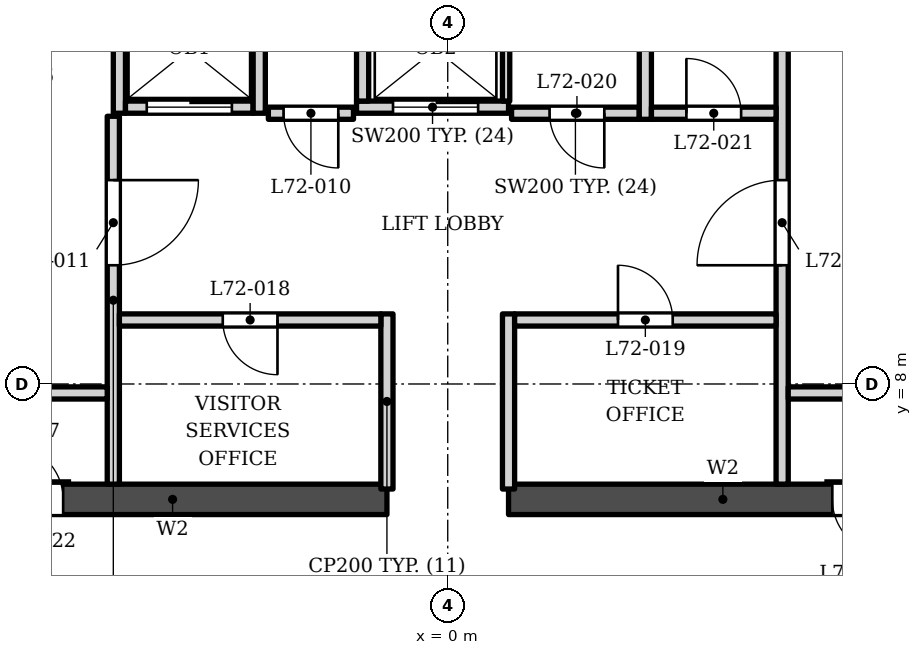
"""IFC4 building model, lengths in metres.
Left out: names, types, materials, properties, quantities, classifications, styles, units other than length and angle.
Written with IfcOpenShell. Run it as: python <this file> out.ifc"""

import sys

from ifc_helpers import new_model, si_unit, direction, frame, frame_2d, origin, place, context, subcontext, project, spatial, rectangle, extrude, element, fill, save


model = new_model("IFC4")
c1 = context("Model", 3, precision=1e-05, world=origin(), true_north=direction((0.0, 1.0)))
c2 = subcontext(c1, "Body", "Model", "MODEL_VIEW")
j1 = project(units=[si_unit("LENGTHUNIT", "METRE"), si_unit("PLANEANGLEUNIT", "RADIAN")], contexts=[c1])
p1 = place(None, origin())
s1 = spatial("IfcSite", under=j1, at=p1, CompositionType="ELEMENT")
p2 = place(p1, origin())
s2 = spatial("IfcBuilding", under=s1, at=p2, CompositionType="ELEMENT")
p3 = place(p2, frame((0.0, 0.0, 302.5)))
s3 = spatial("IfcBuildingStorey", under=s2, at=p3, CompositionType="ELEMENT", Elevation=302.5)
p4 = place(p3, frame((-8.05, 6.103, 0.0), z_axis=(0.0, 0.0, 1.0), x_axis=(1.0, 0.0, 0.0)))
e1 = element("IfcWall", 1, at=p4, inside=s3, PredefinedType="SHEAR", context=c2, shape_type="SweptSolid", body=[
    extrude(rectangle(XDim=7.05, YDim=0.5, at=frame_2d((3.525, 0.0))), origin(), (0.0, 0.0, 1.0), 8.0),
])
p5 = place(p4, frame((0.825, 0.0, 0.0)))
e2 = element("IfcOpeningElement", 2, at=p5, cuts=e1, PredefinedType="OPENING", context=c2, shape_type="SweptSolid", body=[
    extrude(rectangle(XDim=0.9, YDim=2.1, at=frame_2d((0.45, 1.05))), frame((0.0, 0.26, 0.0), z_axis=(0.0, -1.0, 0.0), x_axis=(1.0, 0.0, 0.0)), (0.0, 0.0, 1.0), 0.52),
])
p6 = place(p3, frame((1.0, 6.103, 0.0), z_axis=(0.0, 0.0, 1.0), x_axis=(1.0, 0.0, 0.0)))
e3 = element("IfcWall", 3, at=p6, inside=s3, PredefinedType="SHEAR", context=c2, shape_type="SweptSolid", body=[
    extrude(rectangle(XDim=7.05, YDim=0.5, at=frame_2d((3.525, 0.0))), origin(), (0.0, 0.0, 1.0), 8.0),
])
p7 = place(p6, frame((5.325, 0.0, 0.0)))
e4 = element("IfcOpeningElement", 4, at=p7, cuts=e3, PredefinedType="OPENING", context=c2, shape_type="SweptSolid", body=[
    extrude(rectangle(XDim=0.9, YDim=2.1, at=frame_2d((0.45, 1.05))), frame((0.0, 0.26, 0.0), z_axis=(0.0, -1.0, 0.0), x_axis=(1.0, 0.0, 0.0)), (0.0, 0.0, 1.0), 0.52),
])
for number, where, z_axis, x_axis in (
    (5, (-1.0, 6.273, 0.0), (0.0, 0.0, 1.0), (0.0, 1.0, 0.0)),
    (6, (1.0, 6.273, 0.0), (0.0, 0.0, 1.0), (0.0, 1.0, 0.0)),
):
    element("IfcWall", number, at=place(p3, frame(where, z_axis=z_axis, x_axis=x_axis)), inside=s3, PredefinedType="PARTITIONING", context=c2, shape_type="SweptSolid", body=[
        extrude(rectangle(XDim=2.88, YDim=0.2, at=frame_2d((1.44, 0.0))), origin(), (0.0, 0.0, 1.0), 7.8),
    ])
p8 = place(p3, frame((-5.5, 6.353, 0.0), z_axis=(0.0, 0.0, 1.0), x_axis=(0.0, 1.0, 0.0)))
e7 = element("IfcWall", 7, at=p8, inside=s3, PredefinedType="SOLIDWALL", context=c2, shape_type="SweptSolid", body=[
    extrude(rectangle(XDim=6.05, YDim=0.2, at=frame_2d((3.025, 0.0))), origin(), (0.0, 0.0, 1.0), 7.8),
])
p9 = place(p8, frame((3.6, 0.0, 0.0)))
e8 = element("IfcOpeningElement", 8, at=p9, cuts=e7, PredefinedType="OPENING", context=c2, shape_type="SweptSolid", body=[
    extrude(rectangle(XDim=1.4, YDim=2.1, at=frame_2d((0.7, 1.05))), frame((0.0, 0.11, 0.0), z_axis=(0.0, -1.0, 0.0), x_axis=(1.0, 0.0, 0.0)), (0.0, 0.0, 1.0), 0.22),
])
p10 = place(p3, frame((5.5, 6.353, 0.0), z_axis=(0.0, 0.0, 1.0), x_axis=(0.0, 1.0, 0.0)))
e9 = element("IfcWall", 9, at=p10, inside=s3, PredefinedType="SOLIDWALL", context=c2, shape_type="SweptSolid", body=[
    extrude(rectangle(XDim=7.85, YDim=0.2, at=frame_2d((3.925, 0.0))), origin(), (0.0, 0.0, 1.0), 7.8),
])
p11 = place(p10, frame((3.6, 0.0, 0.0)))
e10 = element("IfcOpeningElement", 10, at=p11, cuts=e9, PredefinedType="OPENING", context=c2, shape_type="SweptSolid", body=[
    extrude(rectangle(XDim=1.4, YDim=2.1, at=frame_2d((0.7, 1.05))), frame((0.0, 0.11, 0.0), z_axis=(0.0, -1.0, 0.0), x_axis=(1.0, 0.0, 0.0)), (0.0, 0.0, 1.0), 0.22),
])
for number, where, z_axis, x_axis in (
    (11, (-8.05, 7.853, 0.0), (0.0, 0.0, 1.0), (1.0, 0.0, 0.0)),
    (12, (5.6, 7.853, 0.0), (0.0, 0.0, 1.0), (1.0, 0.0, 0.0)),
):
    element("IfcWall", number, at=place(p3, frame(where, z_axis=z_axis, x_axis=x_axis)), inside=s3, PredefinedType="SOLIDWALL", context=c2, shape_type="SweptSolid", body=[
        extrude(rectangle(XDim=2.45, YDim=0.2, at=frame_2d((1.225, 0.0))), origin(), (0.0, 0.0, 1.0), 7.8),
    ])
p12 = place(p3, frame((-5.4, 9.052, 0.0), z_axis=(0.0, 0.0, 1.0), x_axis=(1.0, 0.0, 0.0)))
e13 = element("IfcWall", 13, at=p12, inside=s3, PredefinedType="PARTITIONING", context=c2, shape_type="SweptSolid", body=[
    extrude(rectangle(XDim=4.3, YDim=0.2, at=frame_2d((2.15, 0.0))), origin(), (0.0, 0.0, 1.0), 7.8),
])
p13 = place(p12, frame((1.7, 0.0, 0.0)))
e14 = element("IfcOpeningElement", 14, at=p13, cuts=e13, PredefinedType="OPENING", context=c2, shape_type="SweptSolid", body=[
    extrude(rectangle(XDim=0.9, YDim=2.1, at=frame_2d((0.45, 1.05))), frame((0.0, 0.11, 0.0), z_axis=(0.0, -1.0, 0.0), x_axis=(1.0, 0.0, 0.0)), (0.0, 0.0, 1.0), 0.22),
])
p14 = place(p3, frame((1.1, 9.052, 0.0), z_axis=(0.0, 0.0, 1.0), x_axis=(1.0, 0.0, 0.0)))
e15 = element("IfcWall", 15, at=p14, inside=s3, PredefinedType="PARTITIONING", context=c2, shape_type="SweptSolid", body=[
    extrude(rectangle(XDim=4.3, YDim=0.2, at=frame_2d((2.15, 0.0))), origin(), (0.0, 0.0, 1.0), 7.8),
])
p15 = place(p14, frame((1.7, 0.0, 0.0)))
e16 = element("IfcOpeningElement", 16, at=p15, cuts=e15, PredefinedType="OPENING", context=c2, shape_type="SweptSolid", body=[
    extrude(rectangle(XDim=0.9, YDim=2.1, at=frame_2d((0.45, 1.05))), frame((0.0, 0.11, 0.0), z_axis=(0.0, -1.0, 0.0), x_axis=(1.0, 0.0, 0.0)), (0.0, 0.0, 1.0), 0.22),
])
p16 = place(p3, frame((-2.95, 12.453, 0.0), z_axis=(0.0, 0.0, 1.0), x_axis=(1.0, 0.0, 0.0)))
e17 = element("IfcWall", 17, at=p16, inside=s3, PredefinedType="SOLIDWALL", context=c2, shape_type="SweptSolid", body=[
    extrude(rectangle(XDim=1.4, YDim=0.2, at=frame_2d((0.7, 0.0))), origin(), (0.0, 0.0, 1.0), 7.8),
])
p17 = place(p16, frame((0.25, 0.0, 0.0)))
e18 = element("IfcOpeningElement", 18, at=p17, cuts=e17, PredefinedType="OPENING", context=c2, shape_type="SweptSolid", body=[
    extrude(rectangle(XDim=0.9, YDim=2.1, at=frame_2d((0.45, 1.05))), frame((0.0, 0.11, 0.0), z_axis=(0.0, -1.0, 0.0), x_axis=(1.0, 0.0, 0.0)), (0.0, 0.0, 1.0), 0.22),
])
p18 = place(p3, frame((1.05, 12.453, 0.0), z_axis=(0.0, 0.0, 1.0), x_axis=(1.0, 0.0, 0.0)))
e19 = element("IfcWall", 19, at=p18, inside=s3, PredefinedType="SOLIDWALL", context=c2, shape_type="SweptSolid", body=[
    extrude(rectangle(XDim=2.1, YDim=0.2, at=frame_2d((1.05, 0.0))), origin(), (0.0, 0.0, 1.0), 7.8),
])
p19 = place(p18, frame((0.625, 0.0, 0.0)))
e20 = element("IfcOpeningElement", 20, at=p19, cuts=e19, PredefinedType="OPENING", context=c2, shape_type="SweptSolid", body=[
    extrude(rectangle(XDim=0.9, YDim=2.1, at=frame_2d((0.45, 1.05))), frame((0.0, 0.11, 0.0), z_axis=(0.0, -1.0, 0.0), x_axis=(1.0, 0.0, 0.0)), (0.0, 0.0, 1.0), 0.22),
])
p20 = place(p3, frame((3.25, 12.353, 0.0), z_axis=(0.0, 0.0, 1.0), x_axis=(0.0, 1.0, 0.0)))
e21 = element("IfcWall", 21, at=p20, inside=s3, PredefinedType="PARTITIONING", context=c2, shape_type="SweptSolid", body=[
    extrude(rectangle(XDim=3.2, YDim=0.2, at=frame_2d((1.6, 0.0))), origin(), (0.0, 0.0, 1.0), 7.8),
])
p21 = place(p3, frame((3.35, 12.453, 0.0), z_axis=(0.0, 0.0, 1.0), x_axis=(1.0, 0.0, 0.0)))
e22 = element("IfcWall", 22, at=p21, inside=s3, PredefinedType="PARTITIONING", context=c2, shape_type="SweptSolid", body=[
    extrude(rectangle(XDim=2.05, YDim=0.2, at=frame_2d((1.025, 0.0))), origin(), (0.0, 0.0, 1.0), 7.8),
])
p22 = place(p21, frame((0.575, 0.0, 0.0)))
e23 = element("IfcOpeningElement", 23, at=p22, cuts=e22, PredefinedType="OPENING", context=c2, shape_type="SweptSolid", body=[
    extrude(rectangle(XDim=0.9, YDim=2.1, at=frame_2d((0.45, 1.05))), frame((0.0, 0.11, 0.0), z_axis=(0.0, -1.0, 0.0), x_axis=(1.0, 0.0, 0.0)), (0.0, 0.0, 1.0), 0.22),
])
p23 = place(p3, frame((-5.4, 12.453, 0.0), z_axis=(0.0, 0.0, 1.0), x_axis=(0.0, 1.0, 0.0)))
e24 = element("IfcWall", 24, at=p23, inside=s3, PredefinedType="SOLIDWALL", context=c2, shape_type="SweptSolid", body=[
    extrude(rectangle(XDim=3.0, YDim=0.2, at=frame_2d((1.5, 0.0))), origin(), (0.0, 0.0, 1.0), 7.8),
])
p24 = place(p3, frame((-5.3, 12.552, 0.0), z_axis=(0.0, 0.0, 1.0), x_axis=(1.0, 0.0, 0.0)))
e25 = element("IfcWall", 25, at=p24, inside=s3, PredefinedType="SOLIDWALL", context=c2, shape_type="SweptSolid", body=[
    extrude(rectangle(XDim=2.1, YDim=0.2, at=frame_2d((1.05, 0.0))), origin(), (0.0, 0.0, 1.0), 7.8),
])
p25 = place(p24, frame((0.35, 0.0, 0.0)))
e26 = element("IfcOpeningElement", 26, at=p25, cuts=e25, PredefinedType="OPENING", context=c2, shape_type="SweptSolid", body=[
    extrude(rectangle(XDim=1.4, YDim=2.4, at=frame_2d((0.7, 1.2))), frame((0.0, 0.11, 0.0), z_axis=(0.0, -1.0, 0.0), x_axis=(1.0, 0.0, 0.0)), (0.0, 0.0, 1.0), 0.22),
])
p26 = place(p3, frame((-3.1, 12.453, 0.0), z_axis=(0.0, 0.0, 1.0), x_axis=(0.0, 1.0, 0.0)))
e27 = element("IfcWall", 27, at=p26, inside=s3, PredefinedType="SOLIDWALL", context=c2, shape_type="SweptSolid", body=[
    extrude(rectangle(XDim=3.0, YDim=0.2, at=frame_2d((1.5, 0.0))), origin(), (0.0, 0.0, 1.0), 7.8),
])
p27 = place(p3, frame((-1.5, 12.552, 0.0), z_axis=(0.0, 0.0, 1.0), x_axis=(1.0, 0.0, 0.0)))
e28 = element("IfcWall", 28, at=p27, inside=s3, PredefinedType="SOLIDWALL", context=c2, shape_type="SweptSolid", body=[
    extrude(rectangle(XDim=2.5, YDim=0.2, at=frame_2d((1.25, 0.0))), origin(), (0.0, 0.0, 1.0), 7.8),
])
p28 = place(p27, frame((0.6, 0.0, 0.0)))
e29 = element("IfcOpeningElement", 29, at=p28, cuts=e28, PredefinedType="OPENING", context=c2, shape_type="SweptSolid", body=[
    extrude(rectangle(XDim=1.4, YDim=2.4, at=frame_2d((0.7, 1.2))), frame((0.0, 0.11, 0.0), z_axis=(0.0, -1.0, 0.0), x_axis=(1.0, 0.0, 0.0)), (0.0, 0.0, 1.0), 0.22),
])
p29 = place(p3, frame((-1.4, 12.653, 0.0), z_axis=(0.0, 0.0, 1.0), x_axis=(0.0, 1.0, 0.0)))
e30 = element("IfcWall", 30, at=p29, inside=s3, PredefinedType="SOLIDWALL", context=c2, shape_type="SweptSolid", body=[
    extrude(rectangle(XDim=2.6, YDim=0.2, at=frame_2d((1.3, 0.0))), origin(), (0.0, 0.0, 1.0), 7.8),
])
p30 = place(p3, frame((0.96, 12.653, 0.0), z_axis=(0.0, 0.0, 1.0), x_axis=(0.0, 1.0, 0.0)))
e31 = element("IfcWall", 31, at=p30, inside=s3, PredefinedType="SOLIDWALL", context=c2, shape_type="SweptSolid", body=[
    extrude(rectangle(XDim=2.6, YDim=0.12, at=frame_2d((1.3, 0.0))), origin(), (0.0, 0.0, 1.0), 7.8),
])
p31 = place(p25, origin())
e32 = element("IfcDoor", 32, at=p31, inside=s3, OperationType="DOUBLE_DOOR_SLIDING", PredefinedType="DOOR", context=c2, shape_type="SweptSolid", body=[
    extrude(rectangle(XDim=1.4, YDim=2.4, at=frame_2d((0.7, 1.2))), frame((0.0, 0.025, 0.0), z_axis=(0.0, -1.0, 0.0), x_axis=(1.0, 0.0, 0.0)), (0.0, 0.0, 1.0), 0.05),
])
fill(e26, e32)
p32 = place(p28, origin())
e33 = element("IfcDoor", 33, at=p32, inside=s3, OperationType="DOUBLE_DOOR_SLIDING", PredefinedType="DOOR", context=c2, shape_type="SweptSolid", body=[
    extrude(rectangle(XDim=1.4, YDim=2.4, at=frame_2d((0.7, 1.2))), frame((0.0, 0.025, 0.0), z_axis=(0.0, -1.0, 0.0), x_axis=(1.0, 0.0, 0.0)), (0.0, 0.0, 1.0), 0.05),
])
fill(e29, e33)
p33 = place(p17, origin())
e34 = element("IfcDoor", 34, at=p33, inside=s3, OperationType="SINGLE_SWING_RIGHT", PredefinedType="DOOR", context=c2, shape_type="SweptSolid", body=[
    extrude(rectangle(XDim=0.9, YDim=2.1, at=frame_2d((0.45, 1.05))), frame((0.0, 0.025, 0.0), z_axis=(0.0, -1.0, 0.0), x_axis=(1.0, 0.0, 0.0)), (0.0, 0.0, 1.0), 0.05),
])
fill(e18, e34)
p34 = place(p9, origin())
e35 = element("IfcDoor", 35, at=p34, inside=s3, OperationType="SINGLE_SWING_RIGHT", PredefinedType="DOOR", context=c2, shape_type="SweptSolid", body=[
    extrude(rectangle(XDim=1.4, YDim=2.1, at=frame_2d((0.7, 1.05))), frame((0.0, 0.025, 0.0), z_axis=(0.0, -1.0, 0.0), x_axis=(1.0, 0.0, 0.0)), (0.0, 0.0, 1.0), 0.05),
])
fill(e8, e35)
p35 = place(p11, origin())
e36 = element("IfcDoor", 36, at=p35, inside=s3, OperationType="SINGLE_SWING_LEFT", PredefinedType="DOOR", context=c2, shape_type="SweptSolid", body=[
    extrude(rectangle(XDim=1.4, YDim=2.1, at=frame_2d((0.7, 1.05))), frame((0.0, 0.025, 0.0), z_axis=(0.0, -1.0, 0.0), x_axis=(1.0, 0.0, 0.0)), (0.0, 0.0, 1.0), 0.05),
])
fill(e10, e36)
p36 = place(p13, origin())
e37 = element("IfcDoor", 37, at=p36, inside=s3, OperationType="SINGLE_SWING_RIGHT", PredefinedType="DOOR", context=c2, shape_type="SweptSolid", body=[
    extrude(rectangle(XDim=0.9, YDim=2.1, at=frame_2d((0.45, 1.05))), frame((0.0, 0.025, 0.0), z_axis=(0.0, -1.0, 0.0), x_axis=(1.0, 0.0, 0.0)), (0.0, 0.0, 1.0), 0.05),
])
fill(e14, e37)
p37 = place(p15, origin())
e38 = element("IfcDoor", 38, at=p37, inside=s3, OperationType="SINGLE_SWING_LEFT", PredefinedType="DOOR", context=c2, shape_type="SweptSolid", body=[
    extrude(rectangle(XDim=0.9, YDim=2.1, at=frame_2d((0.45, 1.05))), frame((0.0, 0.025, 0.0), z_axis=(0.0, -1.0, 0.0), x_axis=(1.0, 0.0, 0.0)), (0.0, 0.0, 1.0), 0.05),
])
fill(e16, e38)
p38 = place(p19, origin())
e39 = element("IfcDoor", 39, at=p38, inside=s3, OperationType="SINGLE_SWING_RIGHT", PredefinedType="DOOR", context=c2, shape_type="SweptSolid", body=[
    extrude(rectangle(XDim=0.9, YDim=2.1, at=frame_2d((0.45, 1.05))), frame((0.0, 0.025, 0.0), z_axis=(0.0, -1.0, 0.0), x_axis=(1.0, 0.0, 0.0)), (0.0, 0.0, 1.0), 0.05),
])
fill(e20, e39)
p39 = place(p22, origin())
e40 = element("IfcDoor", 40, at=p39, inside=s3, OperationType="SINGLE_SWING_LEFT", PredefinedType="DOOR", context=c2, shape_type="SweptSolid", body=[
    extrude(rectangle(XDim=0.9, YDim=2.1, at=frame_2d((0.45, 1.05))), frame((0.0, 0.025, 0.0), z_axis=(0.0, -1.0, 0.0), x_axis=(1.0, 0.0, 0.0)), (0.0, 0.0, 1.0), 0.05),
])
fill(e23, e40)
p40 = place(p5, origin())
e41 = element("IfcDoor", 41, at=p40, inside=s3, OperationType="SINGLE_SWING_LEFT", PredefinedType="DOOR", context=c2, shape_type="SweptSolid", body=[
    extrude(rectangle(XDim=0.9, YDim=2.1, at=frame_2d((0.45, 1.05))), frame((0.0, 0.025, 0.0), z_axis=(0.0, -1.0, 0.0), x_axis=(1.0, 0.0, 0.0)), (0.0, 0.0, 1.0), 0.05),
])
fill(e2, e41)
p41 = place(p7, origin())
e42 = element("IfcDoor", 42, at=p41, inside=s3, OperationType="SINGLE_SWING_RIGHT", PredefinedType="DOOR", context=c2, shape_type="SweptSolid", body=[
    extrude(rectangle(XDim=0.9, YDim=2.1, at=frame_2d((0.45, 1.05))), frame((0.0, 0.025, 0.0), z_axis=(0.0, -1.0, 0.0), x_axis=(1.0, 0.0, 0.0)), (0.0, 0.0, 1.0), 0.05),
])
fill(e4, e42)
save(model, sys.argv[1])
